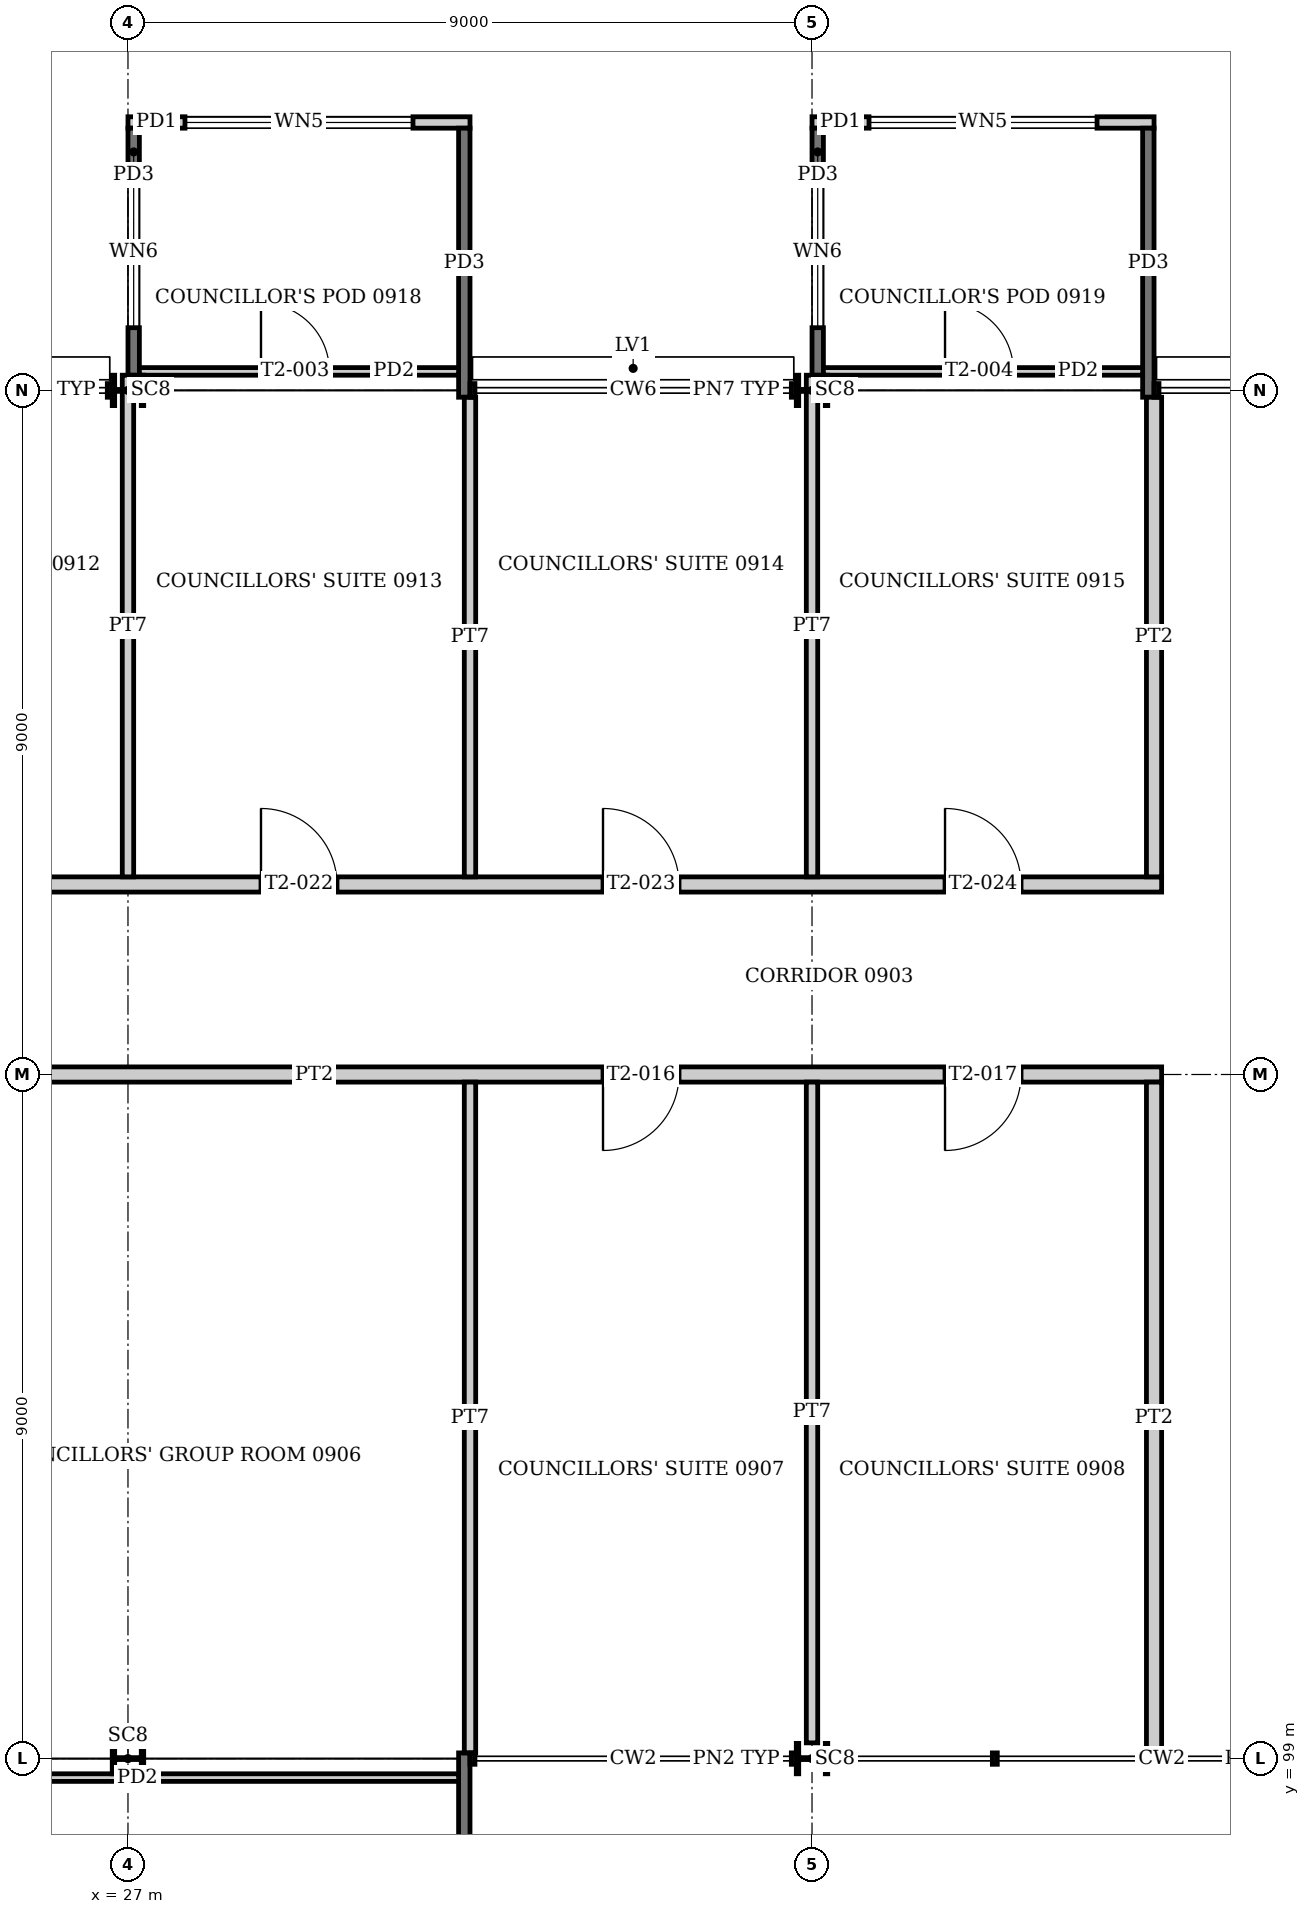
"""IFC4 building model, lengths in metres.
Left out: names, types, materials, properties, quantities, classifications, styles, units other than length and angle.
Written with IfcOpenShell. Run it as: python <this file> out.ifc"""

import sys

from ifc_helpers import new_model, si_unit, direction, frame, frame_2d, origin, origin_2d, place, context, subcontext, project, spatial, rectangle, i_section, extrude, element, fill, save


model = new_model("IFC4")
c1 = context("Model", 3, precision=1e-05, world=origin(), true_north=direction((0.0, 1.0)))
c2 = subcontext(c1, "Body", "Model", "MODEL_VIEW")
j1 = project(units=[si_unit("LENGTHUNIT", "METRE"), si_unit("PLANEANGLEUNIT", "RADIAN")], contexts=[c1])
p1 = place(None, origin())
s1 = spatial("IfcSite", under=j1, at=p1, CompositionType="ELEMENT")
p2 = place(p1, origin())
s2 = spatial("IfcBuilding", under=s1, at=p2, CompositionType="ELEMENT")
p3 = place(p2, frame((0.0, 0.0, 39.2)))
s3 = spatial("IfcBuildingStorey", under=s2, at=p3, CompositionType="ELEMENT", Elevation=39.2)
for number, where, z_axis, x_axis in (
    (1, (27.0, 99.0, 0.0), (0.0, 0.0, 1.0), (0.0, 1.0, 0.0)),
    (2, (27.0, 117.0, 0.0), (0.0, 0.0, 1.0), (0.0, 1.0, 0.0)),
    (3, (36.0, 99.0, 0.0), (0.0, 0.0, 1.0), (0.0, 1.0, 0.0)),
    (4, (36.0, 117.0, 0.0), (0.0, 0.0, 1.0), (0.0, 1.0, 0.0)),
):
    element("IfcColumn", number, at=place(p3, frame(where, z_axis=z_axis, x_axis=x_axis)), inside=s3, PredefinedType="COLUMN", context=c2, shape_type="SweptSolid", body=[
        extrude(i_section(OverallWidth=0.4, OverallDepth=0.414, WebThickness=0.025, FlangeThickness=0.032, at=origin_2d()), origin(), (0.0, 0.0, 1.0), 4.0),
    ])
p4 = place(p3, frame((31.425, 95.55, -0.15), z_axis=(0.0, 0.0, 1.0), x_axis=(0.0, 1.0, 0.0)))
e5 = element("IfcWall", 5, at=p4, inside=s3, PredefinedType="SOLIDWALL", context=c2, shape_type="SweptSolid", body=[
    extrude(rectangle(XDim=3.525, YDim=0.15, at=frame_2d((1.762, 0.0))), origin(), (0.0, 0.0, 1.0), 2.75),
])
p5 = place(p3, frame((13.65, 98.75, 0.0), z_axis=(0.0, 0.0, 1.0), x_axis=(1.0, 0.0, 0.0)))
e6 = element("IfcWall", 6, at=p5, inside=s3, PredefinedType="PARTITIONING", context=c2, shape_type="SweptSolid", body=[
    extrude(rectangle(XDim=17.7, YDim=0.1, at=frame_2d((8.85, 0.0))), origin(), (0.0, 0.0, 1.0), 2.6),
])
p6 = place(p5, frame((8.35, 0.0, 0.0)))
e7 = element("IfcOpeningElement", 7, at=p6, cuts=e6, PredefinedType="OPENING", context=c2, shape_type="SweptSolid", body=[
    extrude(rectangle(XDim=0.9, YDim=2.1, at=frame_2d((0.45, 1.05))), frame((0.0, 0.06, 0.0), z_axis=(0.0, -1.0, 0.0), x_axis=(1.0, 0.0, 0.0)), (0.0, 0.0, 1.0), 0.12),
])
p7 = place(p3, frame((27.0, 120.525, 0.0), z_axis=(0.0, 0.0, 1.0), x_axis=(1.0, 0.0, 0.0)))
e8 = element("IfcWall", 8, at=p7, inside=s3, PredefinedType="SOLIDWALL", context=c2, shape_type="SweptSolid", body=[
    extrude(rectangle(XDim=4.5, YDim=0.15, at=frame_2d((2.25, 0.0))), origin(), (0.0, 0.0, 1.0), 2.6),
])
p8 = place(p7, frame((0.75, 0.0, 0.9)))
e9 = element("IfcOpeningElement", 9, at=p8, cuts=e8, PredefinedType="OPENING", context=c2, shape_type="SweptSolid", body=[
    extrude(rectangle(XDim=3.0, YDim=1.4, at=frame_2d((1.5, 0.7))), frame((0.0, 0.085, 0.0), z_axis=(0.0, -1.0, 0.0), x_axis=(1.0, 0.0, 0.0)), (0.0, 0.0, 1.0), 0.17),
])
p9 = place(p3, frame((27.075, 120.45, -0.15), z_axis=(0.0, 0.0, 1.0), x_axis=(0.0, -1.0, 0.0)))
e10 = element("IfcWall", 10, at=p9, inside=s3, PredefinedType="SOLIDWALL", context=c2, shape_type="SweptSolid", body=[
    extrude(rectangle(XDim=3.25, YDim=0.15, at=frame_2d((1.625, 0.0))), origin(), (0.0, 0.0, 1.0), 2.75),
])
p10 = place(p9, frame((0.625, 0.0, 1.05)))
e11 = element("IfcOpeningElement", 11, at=p10, cuts=e10, PredefinedType="OPENING", context=c2, shape_type="SweptSolid", body=[
    extrude(rectangle(XDim=2.0, YDim=1.4, at=frame_2d((1.0, 0.7))), frame((0.0, 0.085, 0.0), z_axis=(0.0, -1.0, 0.0), x_axis=(1.0, 0.0, 0.0)), (0.0, 0.0, 1.0), 0.17),
])
p11 = place(p3, frame((31.425, 120.45, -0.15), z_axis=(0.0, 0.0, 1.0), x_axis=(0.0, -1.0, 0.0)))
e12 = element("IfcWall", 12, at=p11, inside=s3, PredefinedType="SOLIDWALL", context=c2, shape_type="SweptSolid", body=[
    extrude(rectangle(XDim=3.54, YDim=0.15, at=frame_2d((1.77, 0.0))), origin(), (0.0, 0.0, 1.0), 2.75),
])
p12 = place(p3, frame((27.15, 117.25, 0.0), z_axis=(0.0, 0.0, 1.0), x_axis=(1.0, 0.0, 0.0)))
e13 = element("IfcWall", 13, at=p12, inside=s3, PredefinedType="PARTITIONING", context=c2, shape_type="SweptSolid", body=[
    extrude(rectangle(XDim=4.2, YDim=0.1, at=frame_2d((2.1, 0.0))), origin(), (0.0, 0.0, 1.0), 2.6),
])
p13 = place(p12, frame((1.6, 0.0, 0.0)))
e14 = element("IfcOpeningElement", 14, at=p13, cuts=e13, PredefinedType="OPENING", context=c2, shape_type="SweptSolid", body=[
    extrude(rectangle(XDim=0.9, YDim=2.1, at=frame_2d((0.45, 1.05))), frame((0.0, 0.06, 0.0), z_axis=(0.0, -1.0, 0.0), x_axis=(1.0, 0.0, 0.0)), (0.0, 0.0, 1.0), 0.12),
])
p14 = place(p3, frame((36.0, 120.525, 0.0), z_axis=(0.0, 0.0, 1.0), x_axis=(1.0, 0.0, 0.0)))
e15 = element("IfcWall", 15, at=p14, inside=s3, PredefinedType="SOLIDWALL", context=c2, shape_type="SweptSolid", body=[
    extrude(rectangle(XDim=4.5, YDim=0.15, at=frame_2d((2.25, 0.0))), origin(), (0.0, 0.0, 1.0), 2.6),
])
p15 = place(p14, frame((0.75, 0.0, 0.9)))
e16 = element("IfcOpeningElement", 16, at=p15, cuts=e15, PredefinedType="OPENING", context=c2, shape_type="SweptSolid", body=[
    extrude(rectangle(XDim=3.0, YDim=1.4, at=frame_2d((1.5, 0.7))), frame((0.0, 0.085, 0.0), z_axis=(0.0, -1.0, 0.0), x_axis=(1.0, 0.0, 0.0)), (0.0, 0.0, 1.0), 0.17),
])
p16 = place(p3, frame((36.075, 120.45, -0.15), z_axis=(0.0, 0.0, 1.0), x_axis=(0.0, -1.0, 0.0)))
e17 = element("IfcWall", 17, at=p16, inside=s3, PredefinedType="SOLIDWALL", context=c2, shape_type="SweptSolid", body=[
    extrude(rectangle(XDim=3.25, YDim=0.15, at=frame_2d((1.625, 0.0))), origin(), (0.0, 0.0, 1.0), 2.75),
])
p17 = place(p16, frame((0.625, 0.0, 1.05)))
e18 = element("IfcOpeningElement", 18, at=p17, cuts=e17, PredefinedType="OPENING", context=c2, shape_type="SweptSolid", body=[
    extrude(rectangle(XDim=2.0, YDim=1.4, at=frame_2d((1.0, 0.7))), frame((0.0, 0.085, 0.0), z_axis=(0.0, -1.0, 0.0), x_axis=(1.0, 0.0, 0.0)), (0.0, 0.0, 1.0), 0.17),
])
p18 = place(p3, frame((40.425, 120.45, -0.15), z_axis=(0.0, 0.0, 1.0), x_axis=(0.0, -1.0, 0.0)))
e19 = element("IfcWall", 19, at=p18, inside=s3, PredefinedType="SOLIDWALL", context=c2, shape_type="SweptSolid", body=[
    extrude(rectangle(XDim=3.54, YDim=0.15, at=frame_2d((1.77, 0.0))), origin(), (0.0, 0.0, 1.0), 2.75),
])
p19 = place(p3, frame((36.15, 117.25, 0.0), z_axis=(0.0, 0.0, 1.0), x_axis=(1.0, 0.0, 0.0)))
e20 = element("IfcWall", 20, at=p19, inside=s3, PredefinedType="PARTITIONING", context=c2, shape_type="SweptSolid", body=[
    extrude(rectangle(XDim=4.2, YDim=0.1, at=frame_2d((2.1, 0.0))), origin(), (0.0, 0.0, 1.0), 2.6),
])
p20 = place(p19, frame((1.6, 0.0, 0.0)))
e21 = element("IfcOpeningElement", 21, at=p20, cuts=e20, PredefinedType="OPENING", context=c2, shape_type="SweptSolid", body=[
    extrude(rectangle(XDim=0.9, YDim=2.1, at=frame_2d((0.45, 1.05))), frame((0.0, 0.06, 0.0), z_axis=(0.0, -1.0, 0.0), x_axis=(1.0, 0.0, 0.0)), (0.0, 0.0, 1.0), 0.12),
])
p21 = place(p3, frame((18.08, 108.0, 0.0), z_axis=(0.0, 0.0, 1.0), x_axis=(1.0, 0.0, 0.0)))
e22 = element("IfcWall", 22, at=p21, inside=s3, PredefinedType="PARTITIONING", context=c2, shape_type="SweptSolid", body=[
    extrude(rectangle(XDim=22.52, YDim=0.2, at=frame_2d((11.26, 0.0))), origin(), (0.0, 0.0, 1.0), 3.05),
])
p22 = place(p21, frame((5.77, 0.0, 0.0)))
e23 = element("IfcOpeningElement", 23, at=p22, cuts=e22, PredefinedType="OPENING", context=c2, shape_type="SweptSolid", body=[
    extrude(rectangle(XDim=1.8, YDim=2.1, at=frame_2d((0.9, 1.05))), frame((0.0, 0.11, 0.0), z_axis=(0.0, -1.0, 0.0), x_axis=(1.0, 0.0, 0.0)), (0.0, 0.0, 1.0), 0.22),
])
p23 = place(p21, frame((15.17, 0.0, 0.0)))
e24 = element("IfcOpeningElement", 24, at=p23, cuts=e22, PredefinedType="OPENING", context=c2, shape_type="SweptSolid", body=[
    extrude(rectangle(XDim=1.0, YDim=2.1, at=frame_2d((0.5, 1.05))), frame((0.0, 0.11, 0.0), z_axis=(0.0, -1.0, 0.0), x_axis=(1.0, 0.0, 0.0)), (0.0, 0.0, 1.0), 0.22),
])
p24 = place(p21, frame((19.67, 0.0, 0.0)))
e25 = element("IfcOpeningElement", 25, at=p24, cuts=e22, PredefinedType="OPENING", context=c2, shape_type="SweptSolid", body=[
    extrude(rectangle(XDim=1.0, YDim=2.1, at=frame_2d((0.5, 1.05))), frame((0.0, 0.11, 0.0), z_axis=(0.0, -1.0, 0.0), x_axis=(1.0, 0.0, 0.0)), (0.0, 0.0, 1.0), 0.22),
])
p25 = place(p3, frame((13.4, 110.5, 0.0), z_axis=(0.0, 0.0, 1.0), x_axis=(1.0, 0.0, 0.0)))
e26 = element("IfcWall", 26, at=p25, inside=s3, PredefinedType="PARTITIONING", context=c2, shape_type="SweptSolid", body=[
    extrude(rectangle(XDim=27.2, YDim=0.2, at=frame_2d((13.6, 0.0))), origin(), (0.0, 0.0, 1.0), 3.05),
])
p26 = place(p25, frame((6.35, 0.0, 0.0)))
e27 = element("IfcOpeningElement", 27, at=p26, cuts=e26, PredefinedType="OPENING", context=c2, shape_type="SweptSolid", body=[
    extrude(rectangle(XDim=1.0, YDim=2.1, at=frame_2d((0.5, 1.05))), frame((0.0, 0.11, 0.0), z_axis=(0.0, -1.0, 0.0), x_axis=(1.0, 0.0, 0.0)), (0.0, 0.0, 1.0), 0.22),
])
p27 = place(p25, frame((10.85, 0.0, 0.0)))
e28 = element("IfcOpeningElement", 28, at=p27, cuts=e26, PredefinedType="OPENING", context=c2, shape_type="SweptSolid", body=[
    extrude(rectangle(XDim=1.0, YDim=2.1, at=frame_2d((0.5, 1.05))), frame((0.0, 0.11, 0.0), z_axis=(0.0, -1.0, 0.0), x_axis=(1.0, 0.0, 0.0)), (0.0, 0.0, 1.0), 0.22),
])
p28 = place(p25, frame((15.35, 0.0, 0.0)))
e29 = element("IfcOpeningElement", 29, at=p28, cuts=e26, PredefinedType="OPENING", context=c2, shape_type="SweptSolid", body=[
    extrude(rectangle(XDim=1.0, YDim=2.1, at=frame_2d((0.5, 1.05))), frame((0.0, 0.11, 0.0), z_axis=(0.0, -1.0, 0.0), x_axis=(1.0, 0.0, 0.0)), (0.0, 0.0, 1.0), 0.22),
])
p29 = place(p25, frame((19.85, 0.0, 0.0)))
e30 = element("IfcOpeningElement", 30, at=p29, cuts=e26, PredefinedType="OPENING", context=c2, shape_type="SweptSolid", body=[
    extrude(rectangle(XDim=1.0, YDim=2.1, at=frame_2d((0.5, 1.05))), frame((0.0, 0.11, 0.0), z_axis=(0.0, -1.0, 0.0), x_axis=(1.0, 0.0, 0.0)), (0.0, 0.0, 1.0), 0.22),
])
p30 = place(p25, frame((24.35, 0.0, 0.0)))
e31 = element("IfcOpeningElement", 31, at=p30, cuts=e26, PredefinedType="OPENING", context=c2, shape_type="SweptSolid", body=[
    extrude(rectangle(XDim=1.0, YDim=2.1, at=frame_2d((0.5, 1.05))), frame((0.0, 0.11, 0.0), z_axis=(0.0, -1.0, 0.0), x_axis=(1.0, 0.0, 0.0)), (0.0, 0.0, 1.0), 0.22),
])
p31 = place(p3, frame((27.0, 110.6, 0.0), z_axis=(0.0, 0.0, 1.0), x_axis=(0.0, 1.0, 0.0)))
e32 = element("IfcWall", 32, at=p31, inside=s3, PredefinedType="PARTITIONING", context=c2, shape_type="SweptSolid", body=[
    extrude(rectangle(XDim=6.6, YDim=0.15, at=frame_2d((3.3, 0.0))), origin(), (0.0, 0.0, 1.0), 3.05),
])
p32 = place(p3, frame((31.5, 99.075, 0.0), z_axis=(0.0, 0.0, 1.0), x_axis=(0.0, 1.0, 0.0)))
e33 = element("IfcWall", 33, at=p32, inside=s3, PredefinedType="PARTITIONING", context=c2, shape_type="SweptSolid", body=[
    extrude(rectangle(XDim=8.825, YDim=0.15, at=frame_2d((4.413, 0.0))), origin(), (0.0, 0.0, 1.0), 3.05),
])
p33 = place(p3, frame((31.5, 110.6, 0.0), z_axis=(0.0, 0.0, 1.0), x_axis=(0.0, 1.0, 0.0)))
e34 = element("IfcWall", 34, at=p33, inside=s3, PredefinedType="PARTITIONING", context=c2, shape_type="SweptSolid", body=[
    extrude(rectangle(XDim=6.31, YDim=0.15, at=frame_2d((3.155, 0.0))), origin(), (0.0, 0.0, 1.0), 3.05),
])
p34 = place(p3, frame((36.0, 99.207, 0.0), z_axis=(0.0, 0.0, 1.0), x_axis=(0.0, 1.0, 0.0)))
e35 = element("IfcWall", 35, at=p34, inside=s3, PredefinedType="PARTITIONING", context=c2, shape_type="SweptSolid", body=[
    extrude(rectangle(XDim=8.693, YDim=0.15, at=frame_2d((4.346, 0.0))), origin(), (0.0, 0.0, 1.0), 3.05),
])
p35 = place(p3, frame((36.0, 110.6, 0.0), z_axis=(0.0, 0.0, 1.0), x_axis=(0.0, 1.0, 0.0)))
e36 = element("IfcWall", 36, at=p35, inside=s3, PredefinedType="PARTITIONING", context=c2, shape_type="SweptSolid", body=[
    extrude(rectangle(XDim=6.6, YDim=0.15, at=frame_2d((3.3, 0.0))), origin(), (0.0, 0.0, 1.0), 3.05),
])
p36 = place(p3, frame((40.5, 99.075, 0.0), z_axis=(0.0, 0.0, 1.0), x_axis=(0.0, 1.0, 0.0)))
e37 = element("IfcWall", 37, at=p36, inside=s3, PredefinedType="PARTITIONING", context=c2, shape_type="SweptSolid", body=[
    extrude(rectangle(XDim=8.825, YDim=0.2, at=frame_2d((4.413, 0.0))), origin(), (0.0, 0.0, 1.0), 3.05),
])
p37 = place(p3, frame((40.5, 110.6, 0.0), z_axis=(0.0, 0.0, 1.0), x_axis=(0.0, 1.0, 0.0)))
e38 = element("IfcWall", 38, at=p37, inside=s3, PredefinedType="PARTITIONING", context=c2, shape_type="SweptSolid", body=[
    extrude(rectangle(XDim=6.31, YDim=0.2, at=frame_2d((3.155, 0.0))), origin(), (0.0, 0.0, 1.0), 3.05),
])
p38 = place(p8, origin())
e39 = element("IfcWindow", 39, at=p38, inside=s3, PartitioningType="SINGLE_PANEL", PredefinedType="WINDOW", context=c2, shape_type="SweptSolid", body=[
    extrude(rectangle(XDim=3.0, YDim=1.4, at=frame_2d((1.5, 0.7))), frame((0.0, 0.03, 0.0), z_axis=(0.0, -1.0, 0.0), x_axis=(1.0, 0.0, 0.0)), (0.0, 0.0, 1.0), 0.06),
])
fill(e9, e39)
p39 = place(p10, origin())
e40 = element("IfcWindow", 40, at=p39, inside=s3, PartitioningType="SINGLE_PANEL", PredefinedType="WINDOW", context=c2, shape_type="SweptSolid", body=[
    extrude(rectangle(XDim=2.0, YDim=1.4, at=frame_2d((1.0, 0.7))), frame((0.0, 0.03, 0.0), z_axis=(0.0, -1.0, 0.0), x_axis=(1.0, 0.0, 0.0)), (0.0, 0.0, 1.0), 0.06),
])
fill(e11, e40)
p40 = place(p13, origin())
e41 = element("IfcDoor", 41, at=p40, inside=s3, OperationType="SINGLE_SWING_LEFT", PredefinedType="DOOR", context=c2, shape_type="SweptSolid", body=[
    extrude(rectangle(XDim=0.9, YDim=2.1, at=frame_2d((0.45, 1.05))), frame((0.0, 0.025, 0.0), z_axis=(0.0, -1.0, 0.0), x_axis=(1.0, 0.0, 0.0)), (0.0, 0.0, 1.0), 0.05),
])
fill(e14, e41)
p41 = place(p15, origin())
e42 = element("IfcWindow", 42, at=p41, inside=s3, PartitioningType="SINGLE_PANEL", PredefinedType="WINDOW", context=c2, shape_type="SweptSolid", body=[
    extrude(rectangle(XDim=3.0, YDim=1.4, at=frame_2d((1.5, 0.7))), frame((0.0, 0.03, 0.0), z_axis=(0.0, -1.0, 0.0), x_axis=(1.0, 0.0, 0.0)), (0.0, 0.0, 1.0), 0.06),
])
fill(e16, e42)
p42 = place(p17, origin())
e43 = element("IfcWindow", 43, at=p42, inside=s3, PartitioningType="SINGLE_PANEL", PredefinedType="WINDOW", context=c2, shape_type="SweptSolid", body=[
    extrude(rectangle(XDim=2.0, YDim=1.4, at=frame_2d((1.0, 0.7))), frame((0.0, 0.03, 0.0), z_axis=(0.0, -1.0, 0.0), x_axis=(1.0, 0.0, 0.0)), (0.0, 0.0, 1.0), 0.06),
])
fill(e18, e43)
p43 = place(p20, origin())
e44 = element("IfcDoor", 44, at=p43, inside=s3, OperationType="SINGLE_SWING_LEFT", PredefinedType="DOOR", context=c2, shape_type="SweptSolid", body=[
    extrude(rectangle(XDim=0.9, YDim=2.1, at=frame_2d((0.45, 1.05))), frame((0.0, 0.025, 0.0), z_axis=(0.0, -1.0, 0.0), x_axis=(1.0, 0.0, 0.0)), (0.0, 0.0, 1.0), 0.05),
])
fill(e21, e44)
p44 = place(p23, frame((1.0, 0.0, 0.0), z_axis=(0.0, 0.0, 1.0), x_axis=(-1.0, 0.0, 0.0)))
e45 = element("IfcDoor", 45, at=p44, inside=s3, OperationType="SINGLE_SWING_RIGHT", PredefinedType="DOOR", context=c2, shape_type="SweptSolid", body=[
    extrude(rectangle(XDim=1.0, YDim=2.1, at=frame_2d((0.5, 1.05))), frame((0.0, 0.025, 0.0), z_axis=(0.0, -1.0, 0.0), x_axis=(1.0, 0.0, 0.0)), (0.0, 0.0, 1.0), 0.05),
])
fill(e24, e45)
p45 = place(p24, frame((1.0, 0.0, 0.0), z_axis=(0.0, 0.0, 1.0), x_axis=(-1.0, 0.0, 0.0)))
e46 = element("IfcDoor", 46, at=p45, inside=s3, OperationType="SINGLE_SWING_RIGHT", PredefinedType="DOOR", context=c2, shape_type="SweptSolid", body=[
    extrude(rectangle(XDim=1.0, YDim=2.1, at=frame_2d((0.5, 1.05))), frame((0.0, 0.025, 0.0), z_axis=(0.0, -1.0, 0.0), x_axis=(1.0, 0.0, 0.0)), (0.0, 0.0, 1.0), 0.05),
])
fill(e25, e46)
p46 = place(p28, origin())
e47 = element("IfcDoor", 47, at=p46, inside=s3, OperationType="SINGLE_SWING_LEFT", PredefinedType="DOOR", context=c2, shape_type="SweptSolid", body=[
    extrude(rectangle(XDim=1.0, YDim=2.1, at=frame_2d((0.5, 1.05))), frame((0.0, 0.025, 0.0), z_axis=(0.0, -1.0, 0.0), x_axis=(1.0, 0.0, 0.0)), (0.0, 0.0, 1.0), 0.05),
])
fill(e29, e47)
p47 = place(p29, origin())
e48 = element("IfcDoor", 48, at=p47, inside=s3, OperationType="SINGLE_SWING_LEFT", PredefinedType="DOOR", context=c2, shape_type="SweptSolid", body=[
    extrude(rectangle(XDim=1.0, YDim=2.1, at=frame_2d((0.5, 1.05))), frame((0.0, 0.025, 0.0), z_axis=(0.0, -1.0, 0.0), x_axis=(1.0, 0.0, 0.0)), (0.0, 0.0, 1.0), 0.05),
])
fill(e30, e48)
p48 = place(p30, origin())
e49 = element("IfcDoor", 49, at=p48, inside=s3, OperationType="SINGLE_SWING_LEFT", PredefinedType="DOOR", context=c2, shape_type="SweptSolid", body=[
    extrude(rectangle(XDim=1.0, YDim=2.1, at=frame_2d((0.5, 1.05))), frame((0.0, 0.025, 0.0), z_axis=(0.0, -1.0, 0.0), x_axis=(1.0, 0.0, 0.0)), (0.0, 0.0, 1.0), 0.05),
])
fill(e31, e49)
save(model, sys.argv[1])
